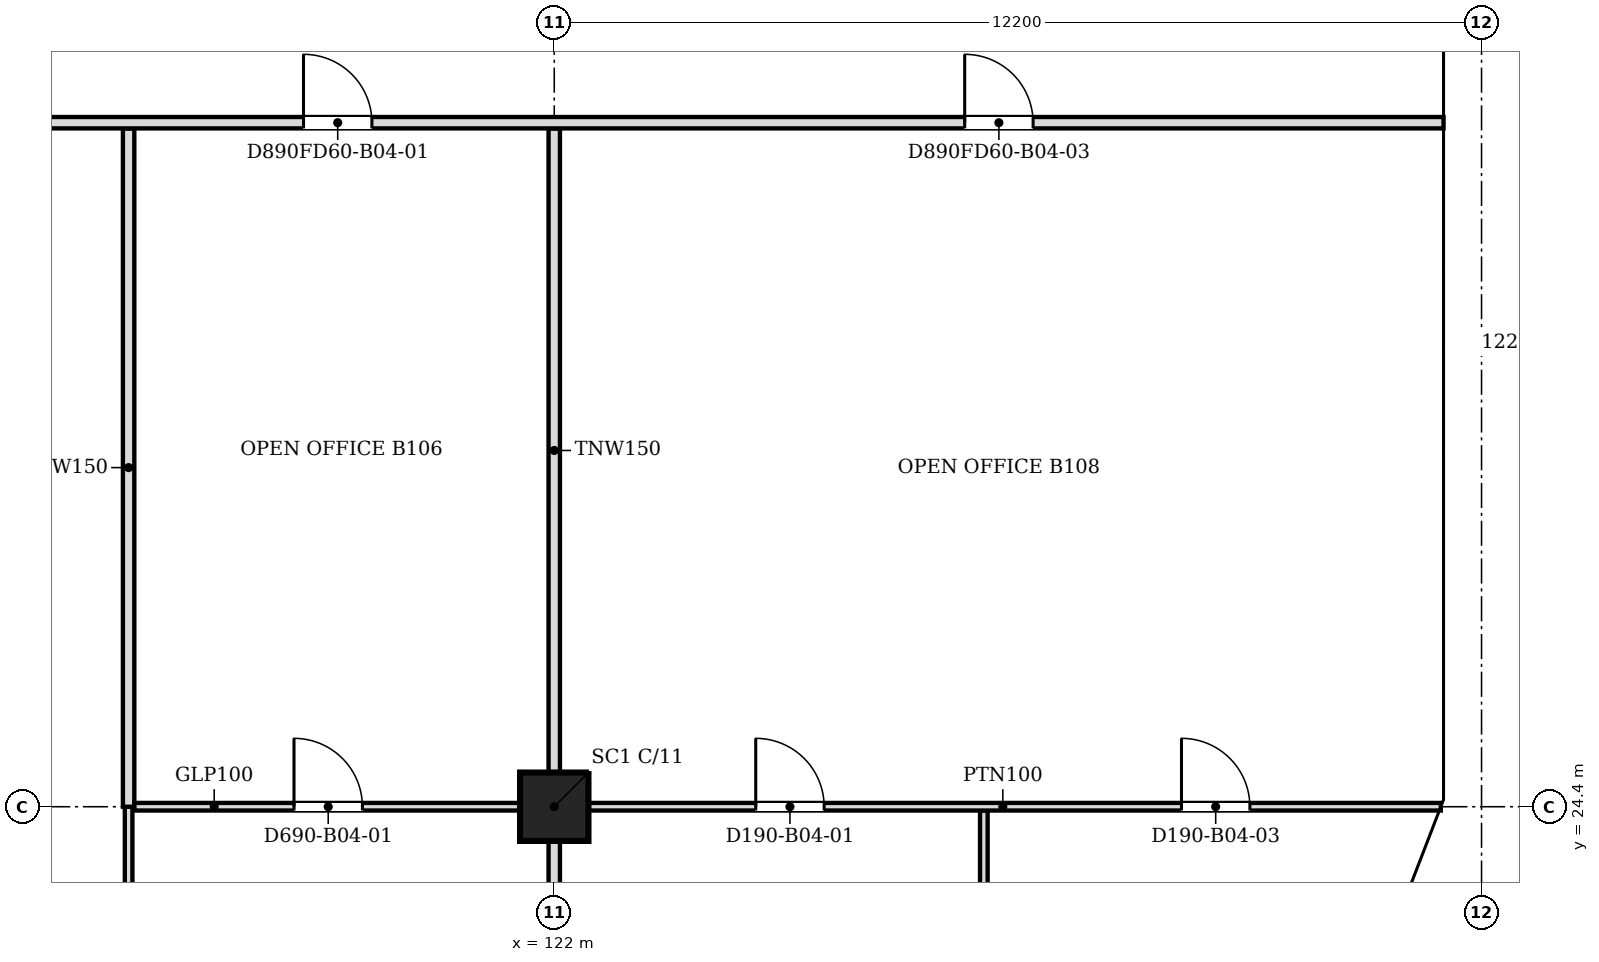
"""IFC4 building model, lengths in metres.
Left out: names, types, materials, properties, quantities, classifications, styles, units other than length and angle.
Written with IfcOpenShell. Run it as: python <this file> out.ifc"""

import sys

from ifc_helpers import new_model, si_unit, direction, frame, frame_2d, origin, origin_2d, place, context, subcontext, project, spatial, polyline, rectangle, outline, extrude, faceted_brep, source, transform, mapped, element, fill, save


model = new_model("IFC4")
c1 = context("Model", 3, precision=1e-05, world=origin(), true_north=direction((0.0, 1.0)))
c2 = subcontext(c1, "Body", "Model", "MODEL_VIEW")
j1 = project(units=[si_unit("LENGTHUNIT", "METRE"), si_unit("PLANEANGLEUNIT", "RADIAN")], contexts=[c1])
p1 = place(None, origin())
s1 = spatial("IfcSite", under=j1, at=p1, CompositionType="ELEMENT")
p2 = place(p1, origin())
s2 = spatial("IfcBuilding", under=s1, at=p2, CompositionType="ELEMENT")
p3 = place(p2, frame((0.0, 0.0, 41.0)))
s3 = spatial("IfcBuildingStorey", under=s2, at=p3, CompositionType="ELEMENT", Elevation=41.0)
p4 = place(p3, frame((122.0, 24.4, 0.0), z_axis=(0.0, 0.0, 1.0), x_axis=(1.0, 0.0, 0.0)))
e1 = element("IfcColumn", 1, at=p4, inside=s3, PredefinedType="COLUMN", context=c2, shape_type="SweptSolid", body=[
    extrude(rectangle(XDim=0.9, YDim=0.9, at=origin_2d()), origin(), (0.0, 0.0, 1.0), 3.6),
])
m1 = source(origin(), c2, "Body", "Brep", [
    faceted_brep([(0.053, -0.25, 0.0), (3.003, -0.25, 3.8), (0.053, -0.25, 7.6), (0.0, -0.25, 7.532), (0.0, -0.25, 0.068), (0.106, 0.25, 7.532), (2.957, 0.25, 3.86), (2.957, 0.25, 3.74), (0.106, 0.25, 0.068), (3.003, 0.0, 3.8), (0.053, 0.0, 0.0), (0.053, 0.0, 7.6)], [[[0, 1, 2, 3, 4]], [[5, 6, 7, 8]], [[8, 7, 9, 1, 0, 10]], [[6, 5, 11, 2, 1, 9]], [[3, 2, 11]], [[10, 0, 4]], [[8, 10, 4, 3, 11, 5]], [[9, 7, 6]]]),
])
p5 = place(p3, frame((132.869, 21.644, -3.8), z_axis=(0.0, 0.0, 1.0), x_axis=(0.359855894603, 0.933007896601, 0.0)))
e2 = element("IfcWall", 2, at=p5, inside=s3, PredefinedType="SOLIDWALL", context=c2, shape_type="MappedRepresentation", body=[
    mapped(m1, transform((0.0, 0.0, 0.0), scale=1.0)),
])
m2 = source(origin(), c2, "Body", "SweptSolid", [
    extrude(outline(polyline([(0.253, 0.665), (2.687, 3.8), (0.253, 6.935), (0.253, 0.665)])), frame((0.0, 0.26, 0.0), z_axis=(0.0, -1.0, 0.0), x_axis=(1.0, 0.0, 0.0)), (0.0, 0.0, 1.0), 0.52),
])
p6 = place(p5, origin())
e3 = element("IfcOpeningElement", 3, at=p6, cuts=e2, PredefinedType="OPENING", context=c2, shape_type="MappedRepresentation", body=[
    mapped(m2, transform((0.0, 0.0, 0.0), scale=1.0)),
])
m3 = source(origin(), c2, "Body", "Brep", [
    faceted_brep([(3.003, -0.25, 0.0), (6.053, -0.25, 3.8), (3.003, -0.25, 7.6), (0.0, -0.25, 3.8), (0.047, 0.25, 3.859), (3.003, 0.25, 7.6), (6.053, 0.25, 3.8), (3.003, 0.25, 0.0), (0.047, 0.25, 3.741), (0.0, 0.0, 3.8)], [[[0, 1, 2, 3]], [[4, 5, 6, 7, 8]], [[7, 6, 1, 0]], [[6, 5, 2, 1]], [[5, 4, 9, 3, 2]], [[8, 7, 0, 3, 9]], [[8, 9, 4]]]),
])
p7 = place(p3, frame((133.95, 24.447, -3.8), z_axis=(0.0, 0.0, 1.0), x_axis=(0.0, 1.0, 0.0)))
e4 = element("IfcWall", 4, at=p7, inside=s3, PredefinedType="SOLIDWALL", context=c2, shape_type="MappedRepresentation", body=[
    mapped(m3, transform((0.0, 0.0, 0.0), scale=1.0)),
])
m4 = source(origin(), c2, "Body", "SweptSolid", [
    extrude(outline(polyline([(3.005, 0.401), (5.733, 3.8), (3.005, 7.199), (0.319, 3.8), (3.005, 0.401)])), frame((0.0, 0.26, 0.0), z_axis=(0.0, -1.0, 0.0), x_axis=(1.0, 0.0, 0.0)), (0.0, 0.0, 1.0), 0.52),
])
p8 = place(p7, origin())
e5 = element("IfcOpeningElement", 5, at=p8, cuts=e4, PredefinedType="OPENING", context=c2, shape_type="MappedRepresentation", body=[
    mapped(m4, transform((0.0, 0.0, 0.0), scale=1.0)),
])
m5 = source(origin(), c2, "Body", "SweptSolid", [
    extrude(outline(polyline([(3.05, 0.0), (6.1, 3.8), (3.05, 7.6), (0.0, 3.8), (3.05, 0.0)])), frame((0.0, 0.25, 0.0), z_axis=(0.0, -1.0, 0.0), x_axis=(1.0, 0.0, 0.0)), (0.0, 0.0, 1.0), 0.5),
])
p9 = place(p3, frame((133.95, 30.5, -3.8), z_axis=(0.0, 0.0, 1.0), x_axis=(0.0, 1.0, 0.0)))
e6 = element("IfcWall", 6, at=p9, inside=s3, PredefinedType="SOLIDWALL", context=c2, shape_type="MappedRepresentation", body=[
    mapped(m5, transform((0.0, 0.0, 0.0), scale=1.0)),
])
m6 = source(origin(), c2, "Body", "SweptSolid", [
    extrude(outline(polyline([(3.05, 0.399), (5.78, 3.8), (3.05, 7.201), (0.321, 3.8), (3.05, 0.399)])), frame((0.0, 0.26, 0.0), z_axis=(0.0, -1.0, 0.0), x_axis=(1.0, 0.0, 0.0)), (0.0, 0.0, 1.0), 0.52),
])
p10 = place(p9, origin())
e7 = element("IfcOpeningElement", 7, at=p10, cuts=e6, PredefinedType="OPENING", context=c2, shape_type="MappedRepresentation", body=[
    mapped(m6, transform((0.0, 0.0, 0.0), scale=1.0)),
])
p11 = place(p2, frame((0.0, 0.0, 44.8)))
s4 = spatial("IfcBuildingStorey", under=s2, at=p11, CompositionType="ELEMENT", Elevation=44.8)
m7 = source(origin(), c2, "Body", "Brep", [
    faceted_brep([(2.95, -0.25, 0.0), (2.997, -0.25, 0.059), (2.997, -0.25, 7.541), (2.95, -0.25, 7.6), (0.0, -0.25, 3.8), (0.053, 0.25, 3.868), (2.904, 0.25, 7.54), (2.904, 0.25, 0.06), (0.053, 0.25, 3.732), (2.95, 0.0, 0.0), (2.95, 0.0, 7.6), (0.0, 0.0, 3.8)], [[[0, 1, 2, 3, 4]], [[5, 6, 7, 8]], [[1, 0, 9]], [[10, 3, 2]], [[6, 5, 11, 4, 3, 10]], [[8, 7, 9, 0, 4, 11]], [[8, 11, 5]], [[1, 9, 7, 6, 10, 2]]]),
])
p12 = place(p11, frame((132.888, 21.694, -3.8), z_axis=(0.0, 0.0, 1.0), x_axis=(0.359901446078, 0.932990326376, 0.0)))
e8 = element("IfcWall", 8, at=p12, inside=s4, PredefinedType="SOLIDWALL", context=c2, shape_type="MappedRepresentation", body=[
    mapped(m7, transform((0.0, 0.0, 0.0), scale=1.0)),
])
m8 = source(origin(), c2, "Body", "SweptSolid", [
    extrude(outline(polyline([(2.75, 6.935), (0.316, 3.8), (2.75, 0.665), (2.75, 6.935)])), frame((0.0, 0.26, 0.0), z_axis=(0.0, -1.0, 0.0), x_axis=(1.0, 0.0, 0.0)), (0.0, 0.0, 1.0), 0.52),
])
p13 = place(p12, origin())
e9 = element("IfcOpeningElement", 9, at=p13, cuts=e8, PredefinedType="OPENING", context=c2, shape_type="MappedRepresentation", body=[
    mapped(m8, transform((0.0, 0.0, 0.0), scale=1.0)),
])
m9 = source(origin(), c2, "Body", "Brep", [
    faceted_brep([(0.047, -0.25, 0.0), (3.05, -0.25, 3.8), (0.047, -0.25, 7.6), (0.0, -0.25, 7.54), (0.0, -0.25, 0.06), (0.093, 0.25, 7.541), (3.05, 0.25, 3.8), (0.093, 0.25, 0.059), (0.047, 0.0, 0.0), (0.047, 0.0, 7.6)], [[[0, 1, 2, 3, 4]], [[5, 6, 7]], [[7, 6, 1, 0, 8]], [[6, 5, 9, 2, 1]], [[3, 2, 9]], [[8, 0, 4]], [[7, 8, 4, 3, 9, 5]]]),
])
p14 = place(p11, frame((133.95, 24.4, -3.8), z_axis=(0.0, 0.0, 1.0), x_axis=(0.0, 1.0, 0.0)))
e10 = element("IfcWall", 10, at=p14, inside=s4, PredefinedType="SOLIDWALL", context=c2, shape_type="MappedRepresentation", body=[
    mapped(m9, transform((0.0, 0.0, 0.0), scale=1.0)),
])
m10 = source(origin(), c2, "Body", "SweptSolid", [
    extrude(outline(polyline([(0.247, 0.656), (2.731, 3.8), (0.247, 6.944), (0.247, 0.656)])), frame((0.0, 0.26, 0.0), z_axis=(0.0, -1.0, 0.0), x_axis=(1.0, 0.0, 0.0)), (0.0, 0.0, 1.0), 0.52),
])
p15 = place(p14, origin())
e11 = element("IfcOpeningElement", 11, at=p15, cuts=e10, PredefinedType="OPENING", context=c2, shape_type="MappedRepresentation", body=[
    mapped(m10, transform((0.0, 0.0, 0.0), scale=1.0)),
])
p16 = place(p11, frame((133.95, 27.45, -3.8), z_axis=(0.0, 0.0, 1.0), x_axis=(0.0, 1.0, 0.0)))
e12 = element("IfcWall", 12, at=p16, inside=s4, PredefinedType="SOLIDWALL", context=c2, shape_type="MappedRepresentation", body=[
    mapped(m5, transform((0.0, 0.0, 0.0), scale=1.0)),
])
p17 = place(p16, origin())
e13 = element("IfcOpeningElement", 13, at=p17, cuts=e12, PredefinedType="OPENING", context=c2, shape_type="MappedRepresentation", body=[
    mapped(m6, transform((0.0, 0.0, 0.0), scale=1.0)),
])
m11 = source(origin(), c2, "Body", "Brep", [
    faceted_brep([(3.05, -0.25, 0.0), (6.1, -0.25, 3.8), (6.1, -0.25, 3.8), (3.05, -0.25, 7.6), (0.0, -0.25, 3.8), (0.0, 0.25, 3.8), (3.05, 0.25, 7.6), (6.1, 0.25, 3.8), (6.1, 0.25, 3.8), (3.05, 0.25, 0.0)], [[[0, 1, 2, 3, 4]], [[5, 6, 7, 8, 9]], [[9, 8, 1, 0]], [[7, 6, 3, 2]], [[6, 5, 4, 3]], [[5, 9, 0, 4]], [[1, 8, 7, 2]]]),
])
p18 = place(p11, frame((133.95, 33.55, -3.8), z_axis=(0.0, 0.0, 1.0), x_axis=(0.0, 1.0, 0.0)))
e14 = element("IfcWall", 14, at=p18, inside=s4, PredefinedType="SOLIDWALL", context=c2, shape_type="MappedRepresentation", body=[
    mapped(m11, transform((0.0, 0.0, 0.0), scale=1.0)),
])
p19 = place(p18, origin())
e15 = element("IfcOpeningElement", 15, at=p19, cuts=e14, PredefinedType="OPENING", context=c2, shape_type="MappedRepresentation", body=[
    mapped(m6, transform((0.0, 0.0, 0.0), scale=1.0)),
])
p20 = place(p3, frame((116.4, 18.8, 0.0), z_axis=(0.0, 0.0, 1.0), x_axis=(0.0, 1.0, 0.0)))
e16 = element("IfcWall", 16, at=p20, inside=s3, PredefinedType="PARTITIONING", context=c2, shape_type="SweptSolid", body=[
    extrude(rectangle(XDim=5.599, YDim=0.1, at=frame_2d((2.799, 0.0))), origin(), (0.0, 0.0, 1.0), 3.067),
])
p21 = place(p3, frame((122.0, 18.8, 0.0), z_axis=(0.0, 0.0, 1.0), x_axis=(0.0, 1.0, 0.0)))
e17 = element("IfcWall", 17, at=p21, inside=s3, PredefinedType="PARTITIONING", context=c2, shape_type="SweptSolid", body=[
    extrude(rectangle(XDim=5.149, YDim=0.15, at=frame_2d((2.574, 0.0))), origin(), (0.0, 0.0, 1.0), 3.067),
])
p22 = place(p3, frame((127.652, 18.8, 0.0), z_axis=(0.0, 0.0, 1.0), x_axis=(0.0, 1.0, 0.0)))
e18 = element("IfcWall", 18, at=p22, inside=s3, PredefinedType="PARTITIONING", context=c2, shape_type="SweptSolid", body=[
    extrude(rectangle(XDim=5.549, YDim=0.1, at=frame_2d((2.774, 0.0))), origin(), (0.0, 0.0, 1.0), 3.067),
])
p23 = place(p3, frame((116.4, 24.4, 0.0), z_axis=(0.0, 0.0, 1.0), x_axis=(0.0, 1.0, 0.0)))
e19 = element("IfcWall", 19, at=p23, inside=s3, PredefinedType="PARTITIONING", context=c2, shape_type="SweptSolid", body=[
    extrude(rectangle(XDim=8.924, YDim=0.15, at=frame_2d((4.462, 0.0))), origin(), (0.0, 0.0, 1.0), 3.067),
])
p24 = place(p3, frame((121.549, 24.4, 0.0), z_axis=(0.0, 0.0, 1.0), x_axis=(-1.0, 0.0, 0.0)))
e20 = element("IfcWall", 20, at=p24, inside=s3, PredefinedType="PARTITIONING", context=c2, shape_type="SweptSolid", body=[
    extrude(rectangle(XDim=5.073, YDim=0.1, at=frame_2d((2.537, 0.0))), origin(), (0.0, 0.0, 1.0), 3.067),
])
m12 = source(origin(), c2, "Body", "SweptSolid", [
    extrude(rectangle(XDim=0.9, YDim=2.1, at=frame_2d((0.45, 1.05))), frame((0.0, 0.06, 0.0), z_axis=(0.0, -1.0, 0.0), x_axis=(1.0, 0.0, 0.0)), (0.0, 0.0, 1.0), 0.12),
])
p25 = place(p24, frame((2.073, 0.0, 0.0)))
e21 = element("IfcOpeningElement", 21, at=p25, cuts=e20, PredefinedType="OPENING", context=c2, shape_type="MappedRepresentation", body=[
    mapped(m12, transform((0.0, 0.0, 0.0), scale=1.0)),
])
p26 = place(p3, frame((133.664, 24.4, 0.0), z_axis=(0.0, 0.0, 1.0), x_axis=(-1.0, 0.0, 0.0)))
e22 = element("IfcWall", 22, at=p26, inside=s3, PredefinedType="PARTITIONING", context=c2, shape_type="SweptSolid", body=[
    extrude(rectangle(XDim=11.213, YDim=0.1, at=frame_2d((5.606, 0.0))), origin(), (0.0, 0.0, 1.0), 3.067),
])
p27 = place(p26, frame((8.113, 0.0, 0.0)))
e23 = element("IfcOpeningElement", 23, at=p27, cuts=e22, PredefinedType="OPENING", context=c2, shape_type="MappedRepresentation", body=[
    mapped(m12, transform((0.0, 0.0, 0.0), scale=1.0)),
])
p28 = place(p26, frame((2.512, 0.0, 0.0)))
e24 = element("IfcOpeningElement", 24, at=p28, cuts=e22, PredefinedType="OPENING", context=c2, shape_type="MappedRepresentation", body=[
    mapped(m12, transform((0.0, 0.0, 0.0), scale=1.0)),
])
p29 = place(p3, frame((122.0, 24.851, 0.0), z_axis=(0.0, 0.0, 1.0), x_axis=(0.0, 1.0, 0.0)))
e25 = element("IfcWall", 25, at=p29, inside=s3, PredefinedType="PARTITIONING", context=c2, shape_type="SweptSolid", body=[
    extrude(rectangle(XDim=8.473, YDim=0.15, at=frame_2d((4.236, 0.0))), origin(), (0.0, 0.0, 1.0), 3.067),
])
p30 = place(p3, frame((133.7, 33.4, 0.0), z_axis=(0.0, 0.0, 1.0), x_axis=(-1.0, 0.0, 0.0)))
e26 = element("IfcWall", 26, at=p30, inside=s3, PredefinedType="PARTITIONING", context=c2, shape_type="SweptSolid", body=[
    extrude(rectangle(XDim=47.8, YDim=0.15, at=frame_2d((23.9, 0.0))), origin(), (0.0, 0.0, 1.0), 3.067),
])
m13 = source(origin(), c2, "Body", "SweptSolid", [
    extrude(rectangle(XDim=0.9, YDim=2.1, at=frame_2d((0.45, 1.05))), frame((0.0, 0.085, 0.0), z_axis=(0.0, -1.0, 0.0), x_axis=(1.0, 0.0, 0.0)), (0.0, 0.0, 1.0), 0.17),
])
p31 = place(p30, frame((14.099, 0.0, 0.0)))
e27 = element("IfcOpeningElement", 27, at=p31, cuts=e26, PredefinedType="OPENING", context=c2, shape_type="MappedRepresentation", body=[
    mapped(m13, transform((0.0, 0.0, 0.0), scale=1.0)),
])
p32 = place(p30, frame((44.3, 0.0, 0.0)))
e28 = element("IfcOpeningElement", 28, at=p32, cuts=e26, PredefinedType="OPENING", context=c2, shape_type="MappedRepresentation", body=[
    mapped(m13, transform((0.0, 0.0, 0.0), scale=1.0)),
])
p33 = place(p30, frame((5.4, 0.0, 0.0)))
e29 = element("IfcOpeningElement", 29, at=p33, cuts=e26, PredefinedType="OPENING", context=c2, shape_type="MappedRepresentation", body=[
    mapped(m13, transform((0.0, 0.0, 0.0), scale=1.0)),
])
m14 = source(origin(), c2, "Body", "SweptSolid", [
    extrude(rectangle(XDim=1.0, YDim=2.1, at=frame_2d((0.5, 1.05))), frame((0.0, 0.085, 0.0), z_axis=(0.0, -1.0, 0.0), x_axis=(1.0, 0.0, 0.0)), (0.0, 0.0, 1.0), 0.17),
])
p34 = place(p30, frame((22.899, 0.0, 0.0)))
e30 = element("IfcOpeningElement", 30, at=p34, cuts=e26, PredefinedType="OPENING", context=c2, shape_type="MappedRepresentation", body=[
    mapped(m14, transform((0.0, 0.0, 0.0), scale=1.0)),
])
p35 = place(p30, frame((35.1, 0.0, 0.0)))
e31 = element("IfcOpeningElement", 31, at=p35, cuts=e26, PredefinedType="OPENING", context=c2, shape_type="MappedRepresentation", body=[
    mapped(m14, transform((0.0, 0.0, 0.0), scale=1.0)),
])
m15 = source(origin(), c2, "Body", "SweptSolid", [
    extrude(rectangle(XDim=0.9, YDim=2.1, at=frame_2d((0.45, 1.05))), frame((0.0, 0.025, 0.0), z_axis=(0.0, -1.0, 0.0), x_axis=(1.0, 0.0, 0.0)), (0.0, 0.0, 1.0), 0.05),
])
p36 = place(p25, origin())
e32 = element("IfcDoor", 32, at=p36, inside=s3, OperationType="SINGLE_SWING_RIGHT", PredefinedType="DOOR", context=c2, shape_type="MappedRepresentation", body=[
    mapped(m15, transform((0.0, 0.0, 0.0), scale=1.0)),
])
fill(e21, e32)
p37 = place(p27, origin())
e33 = element("IfcDoor", 33, at=p37, inside=s3, OperationType="SINGLE_SWING_RIGHT", PredefinedType="DOOR", context=c2, shape_type="MappedRepresentation", body=[
    mapped(m15, transform((0.0, 0.0, 0.0), scale=1.0)),
])
fill(e23, e33)
p38 = place(p31, origin())
e34 = element("IfcDoor", 34, at=p38, inside=s3, OperationType="SINGLE_SWING_RIGHT", PredefinedType="DOOR", context=c2, shape_type="MappedRepresentation", body=[
    mapped(m15, transform((0.0, 0.0, 0.0), scale=1.0)),
])
fill(e27, e34)
p39 = place(p28, origin())
e35 = element("IfcDoor", 35, at=p39, inside=s3, OperationType="SINGLE_SWING_RIGHT", PredefinedType="DOOR", context=c2, shape_type="MappedRepresentation", body=[
    mapped(m15, transform((0.0, 0.0, 0.0), scale=1.0)),
])
fill(e24, e35)
p40 = place(p33, origin())
e36 = element("IfcDoor", 36, at=p40, inside=s3, OperationType="SINGLE_SWING_RIGHT", PredefinedType="DOOR", context=c2, shape_type="MappedRepresentation", body=[
    mapped(m15, transform((0.0, 0.0, 0.0), scale=1.0)),
])
fill(e29, e36)
save(model, sys.argv[1])
